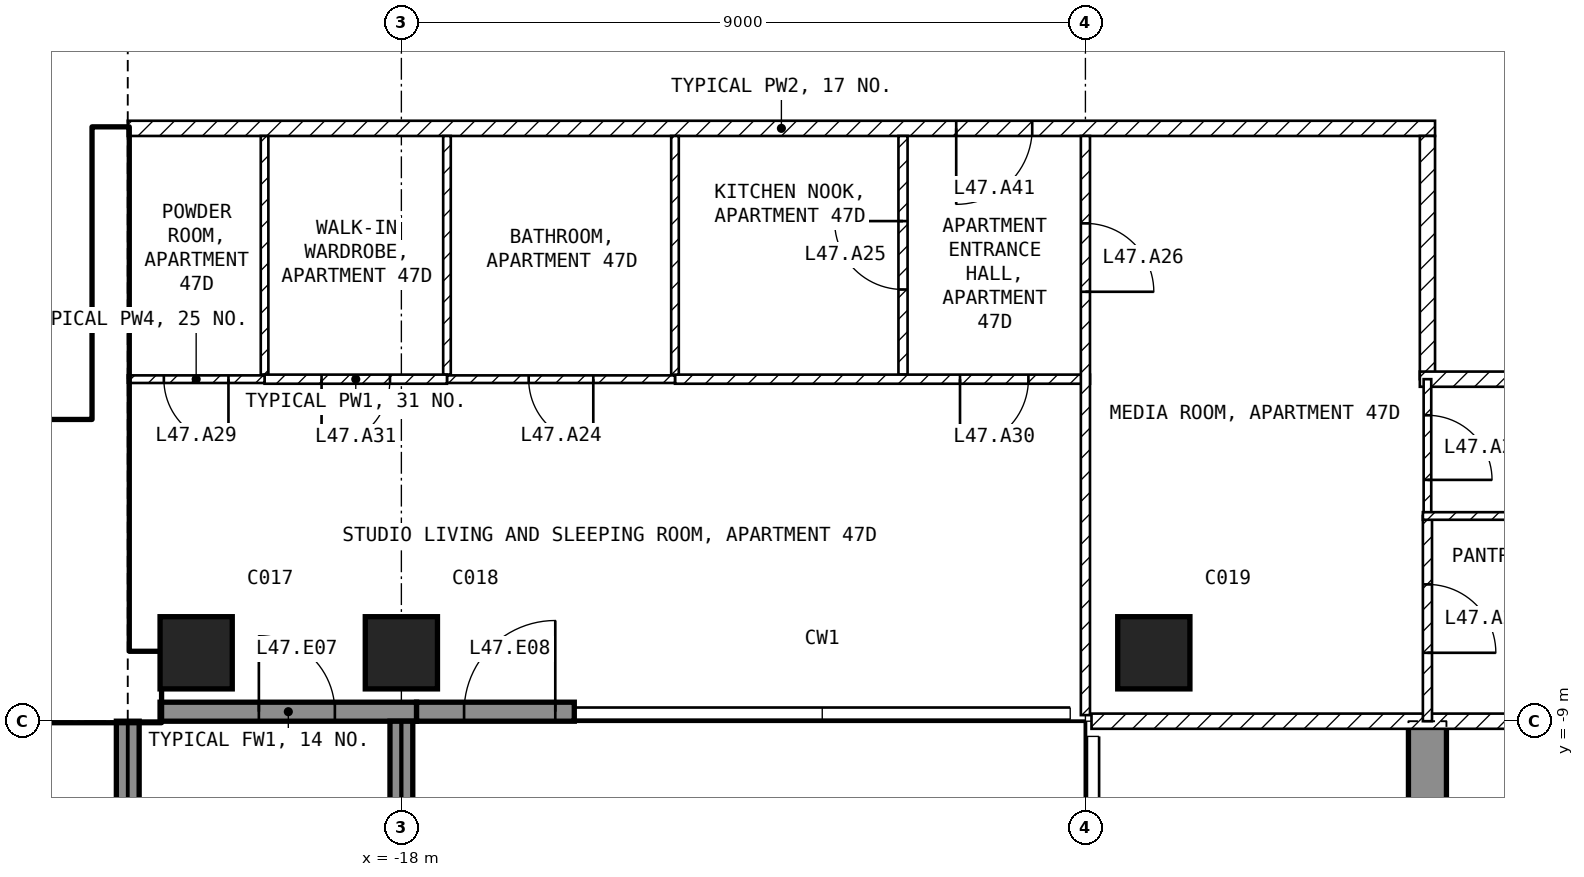
"""IFC4 building model, lengths in metres.
Left out: names, types, materials, properties, quantities, classifications, styles, units other than length and angle.
Written with IfcOpenShell. Run it as: python <this file> out.ifc"""

import sys

from ifc_helpers import new_model, si_unit, direction, frame, frame_2d, origin, origin_2d, place, context, subcontext, project, spatial, polyline, rectangle, outline, extrude, element, fill, save


model = new_model("IFC4")
c1 = context("Model", 3, precision=1e-05, world=origin(), true_north=direction((0.0, 1.0)))
c2 = subcontext(c1, "Body", "Model", "MODEL_VIEW")
j1 = project(units=[si_unit("LENGTHUNIT", "METRE"), si_unit("PLANEANGLEUNIT", "RADIAN")], contexts=[c1])
p1 = place(None, origin())
s1 = spatial("IfcSite", under=j1, at=p1, CompositionType="ELEMENT")
p2 = place(p1, origin())
s2 = spatial("IfcBuilding", under=s1, at=p2, CompositionType="ELEMENT")
p3 = place(p2, frame((0.0, 0.0, 191.1)))
s3 = spatial("IfcBuildingStorey", under=s2, at=p3, CompositionType="ELEMENT", Elevation=191.1)
for number, where, z_axis, x_axis in (
    (1, (-20.7, -8.1, -0.25), (0.0, 0.0, 1.0), (1.0, 0.0, 0.0)),
    (2, (-18.0, -8.1, -0.25), (0.0, 0.0, 1.0), (1.0, 0.0, 0.0)),
    (3, (-8.1, -8.1, -0.25), (0.0, 0.0, 1.0), (1.0, 0.0, 0.0)),
):
    element("IfcColumn", number, at=place(p3, frame(where, z_axis=z_axis, x_axis=x_axis)), inside=s3, PredefinedType="COLUMN", context=c2, shape_type="SweptSolid", body=[
        extrude(rectangle(XDim=0.95, YDim=0.95, at=origin_2d()), origin(), (0.0, 0.0, 1.0), 3.5),
    ])
p4 = place(p3, frame((-4.75, -20.225, -0.25), z_axis=(1.0, 0.0, 0.0), x_axis=(0.0, 1.0, 0.0)))
e4 = element("IfcWall", 4, at=p4, inside=s3, PredefinedType="SHEAR", context=c2, shape_type="SweptSolid", body=[
    extrude(outline(polyline([(0.0, 0.0), (6.725, 0.0), (6.725, 2.65), (9.125, 2.65), (9.125, 0.0), (11.225, 0.0), (11.225, 3.5), (0.0, 3.5), (0.0, 0.0)])), origin(), (0.0, 0.0, 1.0), 0.5),
])
p5 = place(p3, frame((-21.175, -8.875, 0.0), z_axis=(0.0, 0.0, 1.0), x_axis=(1.0, 0.0, 0.0)))
e5 = element("IfcWall", 5, at=p5, inside=s3, PredefinedType="SOLIDWALL", context=c2, shape_type="SweptSolid", body=[
    extrude(rectangle(XDim=3.375, YDim=0.25, at=frame_2d((1.688, 0.0))), origin(), (0.0, 0.0, 1.0), 3.25),
])
p6 = place(p5, frame((1.3, 0.0, 0.0)))
e6 = element("IfcOpeningElement", 6, at=p6, cuts=e5, PredefinedType="OPENING", context=c2, shape_type="SweptSolid", body=[
    extrude(rectangle(XDim=1.0, YDim=2.4, at=frame_2d((0.5, 1.2))), frame((0.0, 0.135, 0.0), z_axis=(0.0, -1.0, 0.0), x_axis=(1.0, 0.0, 0.0)), (0.0, 0.0, 1.0), 0.27),
])
p7 = place(p3, frame((-17.8, -8.875, 0.0), z_axis=(0.0, 0.0, 1.0), x_axis=(1.0, 0.0, 0.0)))
e7 = element("IfcWall", 7, at=p7, inside=s3, PredefinedType="SOLIDWALL", context=c2, shape_type="SweptSolid", body=[
    extrude(rectangle(XDim=2.075, YDim=0.25, at=frame_2d((1.038, 0.0))), origin(), (0.0, 0.0, 1.0), 3.25),
])
p8 = place(p7, frame((0.625, 0.0, 0.0)))
e8 = element("IfcOpeningElement", 8, at=p8, cuts=e7, PredefinedType="OPENING", context=c2, shape_type="SweptSolid", body=[
    extrude(rectangle(XDim=1.2, YDim=2.4, at=frame_2d((0.6, 1.2))), frame((0.0, 0.135, 0.0), z_axis=(0.0, -1.0, 0.0), x_axis=(1.0, 0.0, 0.0)), (0.0, 0.0, 1.0), 0.27),
])
for number, where, z_axis, x_axis in (
    (9, (-21.6, -9.0, 0.0), (0.0, 0.0, 1.0), (0.0, -1.0, 0.0)),
    (10, (-18.0, -9.0, 0.0), (0.0, 0.0, 1.0), (0.0, -1.0, 0.0)),
):
    element("IfcWall", number, at=place(p3, frame(where, z_axis=z_axis, x_axis=x_axis)), inside=s3, PredefinedType="SOLIDWALL", context=c2, shape_type="SweptSolid", body=[
        extrude(rectangle(XDim=2.7, YDim=0.3, at=frame_2d((1.35, 0.0))), origin(), (0.0, 0.0, 1.0), 3.25),
    ])
p9 = place(p3, frame((-30.2, -8.55, 0.0), z_axis=(0.0, 0.0, 1.0), x_axis=(1.0, 0.0, 0.0)))
e11 = element("IfcWall", 11, at=p9, inside=s3, PredefinedType="SHEAR", context=c2, shape_type="SweptSolid", body=[
    extrude(rectangle(XDim=9.025, YDim=0.9, at=frame_2d((4.512, 0.0))), origin(), (0.0, 0.0, 1.0), 3.25),
])
p10 = place(p3, frame((-21.825, -8.1, 0.0), z_axis=(0.0, 0.0, 1.0), x_axis=(0.0, 1.0, 0.0)))
e12 = element("IfcWall", 12, at=p10, inside=s3, PredefinedType="SHEAR", context=c2, shape_type="SweptSolid", body=[
    extrude(rectangle(XDim=6.9, YDim=0.45, at=frame_2d((3.45, 0.0))), origin(), (0.0, 0.0, 1.0), 3.25),
])
p11 = place(p3, frame((-28.35, -5.15, 0.0), z_axis=(0.0, 0.0, 1.0), x_axis=(1.0, 0.0, 0.0)))
e13 = element("IfcWall", 13, at=p11, inside=s3, PredefinedType="SOLIDWALL", context=c2, shape_type="SweptSolid", body=[
    extrude(rectangle(XDim=6.3, YDim=0.2, at=frame_2d((3.15, 0.0))), origin(), (0.0, 0.0, 1.0), 3.25),
])
p12 = place(p11, frame((5.1, 0.0, 0.0)))
e14 = element("IfcOpeningElement", 14, at=p12, cuts=e13, PredefinedType="OPENING", context=c2, shape_type="SweptSolid", body=[
    extrude(rectangle(XDim=1.0, YDim=2.1, at=frame_2d((0.5, 1.05))), frame((0.0, 0.11, 0.0), z_axis=(0.0, -1.0, 0.0), x_axis=(1.0, 0.0, 0.0)), (0.0, 0.0, 1.0), 0.22),
])
p13 = place(p3, frame((-4.4, -1.2, 0.0), z_axis=(0.0, 0.0, 1.0), x_axis=(-1.0, 0.0, 0.0)))
e15 = element("IfcWall", 15, at=p13, inside=s3, PredefinedType="PARTITIONING", context=c2, shape_type="SweptSolid", body=[
    extrude(rectangle(XDim=17.2, YDim=0.2, at=frame_2d((8.6, 0.0))), origin(), (0.0, 0.0, 1.0), 3.25),
])
p14 = place(p13, frame((5.3, 0.0, 0.0)))
e16 = element("IfcOpeningElement", 16, at=p14, cuts=e15, PredefinedType="OPENING", context=c2, shape_type="SweptSolid", body=[
    extrude(rectangle(XDim=1.0, YDim=2.1, at=frame_2d((0.5, 1.05))), frame((0.0, 0.11, 0.0), z_axis=(0.0, -1.0, 0.0), x_axis=(1.0, 0.0, 0.0)), (0.0, 0.0, 1.0), 0.22),
])
p15 = place(p3, frame((-4.5, -4.5, 0.0), z_axis=(0.0, 0.0, 1.0), x_axis=(0.0, 1.0, 0.0)))
e17 = element("IfcWall", 17, at=p15, inside=s3, PredefinedType="PARTITIONING", context=c2, shape_type="SweptSolid", body=[
    extrude(rectangle(XDim=3.2, YDim=0.2, at=frame_2d((1.6, 0.0))), origin(), (0.0, 0.0, 1.0), 3.25),
])
p16 = place(p3, frame((-1.1, -4.5, 0.0), z_axis=(0.0, 0.0, 1.0), x_axis=(-1.0, 0.0, 0.0)))
e18 = element("IfcWall", 18, at=p16, inside=s3, PredefinedType="PARTITIONING", context=c2, shape_type="SweptSolid", body=[
    extrude(rectangle(XDim=3.5, YDim=0.2, at=frame_2d((1.75, 0.0))), origin(), (0.0, 0.0, 1.0), 3.25),
])
p17 = place(p3, frame((8.92, -9.0, 0.0), z_axis=(0.0, 0.0, 1.0), x_axis=(-1.0, 0.0, 0.0)))
e19 = element("IfcWall", 19, at=p17, inside=s3, PredefinedType="PARTITIONING", context=c2, shape_type="SweptSolid", body=[
    extrude(rectangle(XDim=17.84, YDim=0.2, at=frame_2d((8.92, 0.0))), origin(), (0.0, 0.0, 1.0), 3.25),
])
p18 = place(p17, frame((8.42, 0.0, 0.0)))
e20 = element("IfcOpeningElement", 20, at=p18, cuts=e19, PredefinedType="OPENING", context=c2, shape_type="SweptSolid", body=[
    extrude(rectangle(XDim=1.0, YDim=2.1, at=frame_2d((0.5, 1.05))), frame((0.0, 0.11, 0.0), z_axis=(0.0, -1.0, 0.0), x_axis=(1.0, 0.0, 0.0)), (0.0, 0.0, 1.0), 0.22),
])
p19 = place(p3, frame((-11.4, -4.44, 0.0), z_axis=(0.0, 0.0, 1.0), x_axis=(0.0, 1.0, 0.0)))
e21 = element("IfcWall", 21, at=p19, inside=s3, PredefinedType="PARTITIONING", context=c2, shape_type="SweptSolid", body=[
    extrude(rectangle(XDim=3.14, YDim=0.12, at=frame_2d((1.57, 0.0))), origin(), (0.0, 0.0, 1.0), 3.25),
])
p20 = place(p19, frame((1.12, 0.0, 0.0)))
e22 = element("IfcOpeningElement", 22, at=p20, cuts=e21, PredefinedType="OPENING", context=c2, shape_type="SweptSolid", body=[
    extrude(rectangle(XDim=0.9, YDim=2.1, at=frame_2d((0.45, 1.05))), frame((0.0, 0.07, 0.0), z_axis=(0.0, -1.0, 0.0), x_axis=(1.0, 0.0, 0.0)), (0.0, 0.0, 1.0), 0.14),
])
p21 = place(p3, frame((-8.94, -4.5, 0.0), z_axis=(0.0, 0.0, 1.0), x_axis=(-1.0, 0.0, 0.0)))
e23 = element("IfcWall", 23, at=p21, inside=s3, PredefinedType="PARTITIONING", context=c2, shape_type="SweptSolid", body=[
    extrude(rectangle(XDim=5.46, YDim=0.12, at=frame_2d((2.73, 0.0))), origin(), (0.0, 0.0, 1.0), 3.25),
])
p22 = place(p21, frame((0.81, 0.0, 0.0)))
e24 = element("IfcOpeningElement", 24, at=p22, cuts=e23, PredefinedType="OPENING", context=c2, shape_type="SweptSolid", body=[
    extrude(rectangle(XDim=0.9, YDim=2.1, at=frame_2d((0.45, 1.05))), frame((0.0, 0.07, 0.0), z_axis=(0.0, -1.0, 0.0), x_axis=(1.0, 0.0, 0.0)), (0.0, 0.0, 1.0), 0.14),
])
p23 = place(p3, frame((-9.0, -1.3, 0.0), z_axis=(0.0, 0.0, 1.0), x_axis=(0.0, -1.0, 0.0)))
e25 = element("IfcWall", 25, at=p23, inside=s3, PredefinedType="PARTITIONING", context=c2, shape_type="SweptSolid", body=[
    extrude(rectangle(XDim=7.62, YDim=0.12, at=frame_2d((3.81, 0.0))), origin(), (0.0, 0.0, 1.0), 3.25),
])
p24 = place(p23, frame((1.15, 0.0, 0.0)))
e26 = element("IfcOpeningElement", 26, at=p24, cuts=e25, PredefinedType="OPENING", context=c2, shape_type="SweptSolid", body=[
    extrude(rectangle(XDim=0.9, YDim=2.1, at=frame_2d((0.45, 1.05))), frame((0.0, 0.07, 0.0), z_axis=(0.0, -1.0, 0.0), x_axis=(1.0, 0.0, 0.0)), (0.0, 0.0, 1.0), 0.14),
])
for number, where, z_axis, x_axis in (
    (27, (-14.4, -4.44, 0.0), (0.0, 0.0, 1.0), (0.0, 1.0, 0.0)),
    (28, (-17.4, -4.44, 0.0), (0.0, 0.0, 1.0), (0.0, 1.0, 0.0)),
):
    element("IfcWall", number, at=place(p3, frame(where, z_axis=z_axis, x_axis=x_axis)), inside=s3, PredefinedType="PARTITIONING", context=c2, shape_type="SweptSolid", body=[
        extrude(rectangle(XDim=3.14, YDim=0.1, at=frame_2d((1.57, 0.0))), origin(), (0.0, 0.0, 1.0), 3.25),
    ])
p25 = place(p3, frame((-14.4, -4.5, 0.0), z_axis=(0.0, 0.0, 1.0), x_axis=(-1.0, 0.0, 0.0)))
e29 = element("IfcWall", 29, at=p25, inside=s3, PredefinedType="PARTITIONING", context=c2, shape_type="SweptSolid", body=[
    extrude(rectangle(XDim=3.0, YDim=0.1, at=frame_2d((1.5, 0.0))), origin(), (0.0, 0.0, 1.0), 3.25),
])
p26 = place(p25, frame((1.075, 0.0, 0.0)))
e30 = element("IfcOpeningElement", 30, at=p26, cuts=e29, PredefinedType="OPENING", context=c2, shape_type="SweptSolid", body=[
    extrude(rectangle(XDim=0.85, YDim=2.1, at=frame_2d((0.425, 1.05))), frame((0.0, 0.06, 0.0), z_axis=(0.0, -1.0, 0.0), x_axis=(1.0, 0.0, 0.0)), (0.0, 0.0, 1.0), 0.12),
])
p27 = place(p3, frame((-19.8, -4.44, 0.0), z_axis=(0.0, 0.0, 1.0), x_axis=(0.0, 1.0, 0.0)))
e31 = element("IfcWall", 31, at=p27, inside=s3, PredefinedType="PARTITIONING", context=c2, shape_type="SweptSolid", body=[
    extrude(rectangle(XDim=3.14, YDim=0.1, at=frame_2d((1.57, 0.0))), origin(), (0.0, 0.0, 1.0), 3.25),
])
p28 = place(p3, frame((-17.4, -4.5, 0.0), z_axis=(0.0, 0.0, 1.0), x_axis=(-1.0, 0.0, 0.0)))
e32 = element("IfcWall", 32, at=p28, inside=s3, PredefinedType="PARTITIONING", context=c2, shape_type="SweptSolid", body=[
    extrude(rectangle(XDim=2.4, YDim=0.12, at=frame_2d((1.2, 0.0))), origin(), (0.0, 0.0, 1.0), 3.25),
])
p29 = place(p28, frame((0.75, 0.0, 0.0)))
e33 = element("IfcOpeningElement", 33, at=p29, cuts=e32, PredefinedType="OPENING", context=c2, shape_type="SweptSolid", body=[
    extrude(rectangle(XDim=0.9, YDim=2.1, at=frame_2d((0.45, 1.05))), frame((0.0, 0.07, 0.0), z_axis=(0.0, -1.0, 0.0), x_axis=(1.0, 0.0, 0.0)), (0.0, 0.0, 1.0), 0.14),
])
p30 = place(p3, frame((-19.8, -4.5, 0.0), z_axis=(0.0, 0.0, 1.0), x_axis=(-1.0, 0.0, 0.0)))
e34 = element("IfcWall", 34, at=p30, inside=s3, PredefinedType="PARTITIONING", context=c2, shape_type="SweptSolid", body=[
    extrude(rectangle(XDim=1.8, YDim=0.1, at=frame_2d((0.9, 0.0))), origin(), (0.0, 0.0, 1.0), 3.25),
])
p31 = place(p30, frame((0.475, 0.0, 0.0)))
e35 = element("IfcOpeningElement", 35, at=p31, cuts=e34, PredefinedType="OPENING", context=c2, shape_type="SweptSolid", body=[
    extrude(rectangle(XDim=0.85, YDim=2.1, at=frame_2d((0.425, 1.05))), frame((0.0, 0.06, 0.0), z_axis=(0.0, -1.0, 0.0), x_axis=(1.0, 0.0, 0.0)), (0.0, 0.0, 1.0), 0.12),
])
p32 = place(p3, frame((-4.5, -4.5, 0.0), z_axis=(0.0, 0.0, 1.0), x_axis=(0.0, -1.0, 0.0)))
e36 = element("IfcWall", 36, at=p32, inside=s3, PredefinedType="PARTITIONING", context=c2, shape_type="SweptSolid", body=[
    extrude(rectangle(XDim=1.8, YDim=0.1, at=frame_2d((0.9, 0.0))), origin(), (0.0, 0.0, 1.0), 3.25),
])
p33 = place(p32, frame((0.475, 0.0, 0.0)))
e37 = element("IfcOpeningElement", 37, at=p33, cuts=e36, PredefinedType="OPENING", context=c2, shape_type="SweptSolid", body=[
    extrude(rectangle(XDim=0.85, YDim=2.1, at=frame_2d((0.425, 1.05))), frame((0.0, 0.06, 0.0), z_axis=(0.0, -1.0, 0.0), x_axis=(1.0, 0.0, 0.0)), (0.0, 0.0, 1.0), 0.12),
])
p34 = place(p3, frame((-4.5, -6.3, 0.0), z_axis=(0.0, 0.0, 1.0), x_axis=(0.0, -1.0, 0.0)))
e38 = element("IfcWall", 38, at=p34, inside=s3, PredefinedType="PARTITIONING", context=c2, shape_type="SweptSolid", body=[
    extrude(rectangle(XDim=2.7, YDim=0.12, at=frame_2d((1.35, 0.0))), origin(), (0.0, 0.0, 1.0), 3.25),
])
p35 = place(p34, frame((0.9, 0.0, 0.0)))
e39 = element("IfcOpeningElement", 39, at=p35, cuts=e38, PredefinedType="OPENING", context=c2, shape_type="SweptSolid", body=[
    extrude(rectangle(XDim=0.9, YDim=2.1, at=frame_2d((0.45, 1.05))), frame((0.0, 0.07, 0.0), z_axis=(0.0, -1.0, 0.0), x_axis=(1.0, 0.0, 0.0)), (0.0, 0.0, 1.0), 0.14),
])
p36 = place(p3, frame((-1.1, -6.3, 0.0), z_axis=(0.0, 0.0, 1.0), x_axis=(-1.0, 0.0, 0.0)))
e40 = element("IfcWall", 40, at=p36, inside=s3, PredefinedType="PARTITIONING", context=c2, shape_type="SweptSolid", body=[
    extrude(rectangle(XDim=3.46, YDim=0.1, at=frame_2d((1.73, 0.0))), origin(), (0.0, 0.0, 1.0), 3.25),
])
p37 = place(p6, origin())
e41 = element("IfcDoor", 41, at=p37, inside=s3, OperationType="SINGLE_SWING_LEFT", PredefinedType="DOOR", context=c2, shape_type="SweptSolid", body=[
    extrude(rectangle(XDim=1.0, YDim=2.4, at=frame_2d((0.5, 1.2))), frame((0.0, 0.025, 0.0), z_axis=(0.0, -1.0, 0.0), x_axis=(1.0, 0.0, 0.0)), (0.0, 0.0, 1.0), 0.05),
])
fill(e6, e41)
p38 = place(p8, origin())
e42 = element("IfcDoor", 42, at=p38, inside=s3, OperationType="SINGLE_SWING_RIGHT", PredefinedType="DOOR", context=c2, shape_type="SweptSolid", body=[
    extrude(rectangle(XDim=1.2, YDim=2.4, at=frame_2d((0.6, 1.2))), frame((0.0, 0.025, 0.0), z_axis=(0.0, -1.0, 0.0), x_axis=(1.0, 0.0, 0.0)), (0.0, 0.0, 1.0), 0.05),
])
fill(e8, e42)
p39 = place(p12, origin())
e43 = element("IfcDoor", 43, at=p39, inside=s3, OperationType="SINGLE_SWING_LEFT", PredefinedType="DOOR", context=c2, shape_type="SweptSolid", body=[
    extrude(rectangle(XDim=1.0, YDim=2.1, at=frame_2d((0.5, 1.05))), frame((0.0, 0.025, 0.0), z_axis=(0.0, -1.0, 0.0), x_axis=(1.0, 0.0, 0.0)), (0.0, 0.0, 1.0), 0.05),
])
fill(e14, e43)
p40 = place(p26, origin())
e44 = element("IfcDoor", 44, at=p40, inside=s3, OperationType="SINGLE_SWING_LEFT", PredefinedType="DOOR", context=c2, shape_type="SweptSolid", body=[
    extrude(rectangle(XDim=0.85, YDim=2.1, at=frame_2d((0.425, 1.05))), frame((0.0, 0.025, 0.0), z_axis=(0.0, -1.0, 0.0), x_axis=(1.0, 0.0, 0.0)), (0.0, 0.0, 1.0), 0.05),
])
fill(e30, e44)
p41 = place(p20, origin())
e45 = element("IfcDoor", 45, at=p41, inside=s3, OperationType="SINGLE_SWING_RIGHT", PredefinedType="DOOR", context=c2, shape_type="SweptSolid", body=[
    extrude(rectangle(XDim=0.9, YDim=2.1, at=frame_2d((0.45, 1.05))), frame((0.0, 0.025, 0.0), z_axis=(0.0, -1.0, 0.0), x_axis=(1.0, 0.0, 0.0)), (0.0, 0.0, 1.0), 0.05),
])
fill(e22, e45)
p42 = place(p24, origin())
e46 = element("IfcDoor", 46, at=p42, inside=s3, OperationType="SINGLE_SWING_RIGHT", PredefinedType="DOOR", context=c2, shape_type="SweptSolid", body=[
    extrude(rectangle(XDim=0.9, YDim=2.1, at=frame_2d((0.45, 1.05))), frame((0.0, 0.025, 0.0), z_axis=(0.0, -1.0, 0.0), x_axis=(1.0, 0.0, 0.0)), (0.0, 0.0, 1.0), 0.05),
])
fill(e26, e46)
p43 = place(p35, origin())
e47 = element("IfcDoor", 47, at=p43, inside=s3, OperationType="SINGLE_SWING_RIGHT", PredefinedType="DOOR", context=c2, shape_type="SweptSolid", body=[
    extrude(rectangle(XDim=0.9, YDim=2.1, at=frame_2d((0.45, 1.05))), frame((0.0, 0.025, 0.0), z_axis=(0.0, -1.0, 0.0), x_axis=(1.0, 0.0, 0.0)), (0.0, 0.0, 1.0), 0.05),
])
fill(e39, e47)
p44 = place(p33, origin())
e48 = element("IfcDoor", 48, at=p44, inside=s3, OperationType="SINGLE_SWING_RIGHT", PredefinedType="DOOR", context=c2, shape_type="SweptSolid", body=[
    extrude(rectangle(XDim=0.85, YDim=2.1, at=frame_2d((0.425, 1.05))), frame((0.0, 0.025, 0.0), z_axis=(0.0, -1.0, 0.0), x_axis=(1.0, 0.0, 0.0)), (0.0, 0.0, 1.0), 0.05),
])
fill(e37, e48)
p45 = place(p31, origin())
e49 = element("IfcDoor", 49, at=p45, inside=s3, OperationType="SINGLE_SWING_LEFT", PredefinedType="DOOR", context=c2, shape_type="SweptSolid", body=[
    extrude(rectangle(XDim=0.85, YDim=2.1, at=frame_2d((0.425, 1.05))), frame((0.0, 0.025, 0.0), z_axis=(0.0, -1.0, 0.0), x_axis=(1.0, 0.0, 0.0)), (0.0, 0.0, 1.0), 0.05),
])
fill(e35, e49)
p46 = place(p22, origin())
e50 = element("IfcDoor", 50, at=p46, inside=s3, OperationType="SINGLE_SWING_RIGHT", PredefinedType="DOOR", context=c2, shape_type="SweptSolid", body=[
    extrude(rectangle(XDim=0.9, YDim=2.1, at=frame_2d((0.45, 1.05))), frame((0.0, 0.025, 0.0), z_axis=(0.0, -1.0, 0.0), x_axis=(1.0, 0.0, 0.0)), (0.0, 0.0, 1.0), 0.05),
])
fill(e24, e50)
p47 = place(p29, origin())
e51 = element("IfcDoor", 51, at=p47, inside=s3, OperationType="SINGLE_SWING_RIGHT", PredefinedType="DOOR", context=c2, shape_type="SweptSolid", body=[
    extrude(rectangle(XDim=0.9, YDim=2.1, at=frame_2d((0.45, 1.05))), frame((0.0, 0.025, 0.0), z_axis=(0.0, -1.0, 0.0), x_axis=(1.0, 0.0, 0.0)), (0.0, 0.0, 1.0), 0.05),
])
fill(e33, e51)
p48 = place(p14, origin())
e52 = element("IfcDoor", 52, at=p48, inside=s3, OperationType="SINGLE_SWING_RIGHT", PredefinedType="DOOR", context=c2, shape_type="SweptSolid", body=[
    extrude(rectangle(XDim=1.0, YDim=2.1, at=frame_2d((0.5, 1.05))), frame((0.0, 0.025, 0.0), z_axis=(0.0, -1.0, 0.0), x_axis=(1.0, 0.0, 0.0)), (0.0, 0.0, 1.0), 0.05),
])
fill(e16, e52)
save(model, sys.argv[1])
